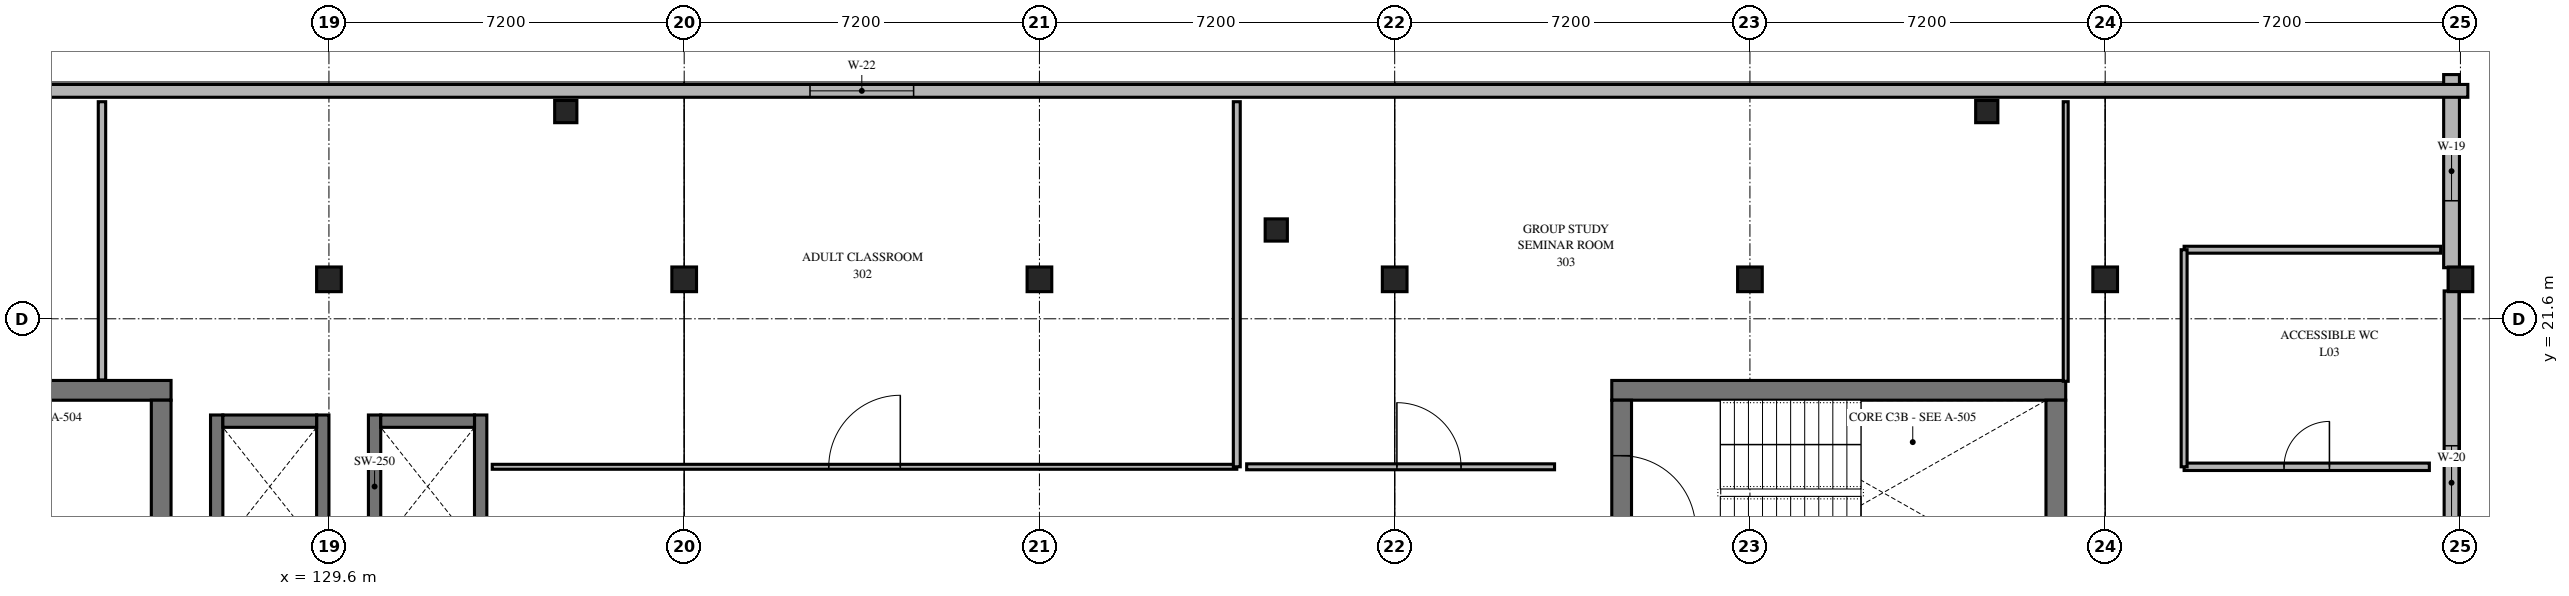
"""IFC4 building model, lengths in metres.
Left out: names, types, materials, properties, quantities, classifications, styles, units other than length and angle.
Written with IfcOpenShell. Run it as: python <this file> out.ifc"""

import sys

from ifc_helpers import new_model, si_unit, direction, frame, frame_2d, origin, origin_2d, place, context, subcontext, project, spatial, rectangle, extrude, element, fill, save


model = new_model("IFC4")
c1 = context("Model", 3, precision=1e-05, world=origin(), true_north=direction((0.0, 1.0)))
c2 = subcontext(c1, "Body", "Model", "MODEL_VIEW")
j1 = project(units=[si_unit("LENGTHUNIT", "METRE"), si_unit("PLANEANGLEUNIT", "RADIAN")], contexts=[c1])
p1 = place(None, origin())
s1 = spatial("IfcSite", under=j1, at=p1, CompositionType="ELEMENT")
p2 = place(p1, origin())
s2 = spatial("IfcBuilding", under=s1, at=p2, CompositionType="ELEMENT")
p3 = place(p2, frame((0.0, 0.0, 12.9)))
s3 = spatial("IfcBuildingStorey", under=s2, at=p3, CompositionType="ELEMENT", Elevation=12.9)
for number, where, z_axis, x_axis in (
    (1, (129.6, 22.4, 0.0), (0.0, 0.0, 1.0), (1.0, 0.0, 0.0)),
    (2, (136.8, 22.4, 0.0), (0.0, 0.0, 1.0), (1.0, 0.0, 0.0)),
    (3, (144.0, 22.4, 0.0), (0.0, 0.0, 1.0), (1.0, 0.0, 0.0)),
    (4, (151.2, 22.4, 0.0), (0.0, 0.0, 1.0), (1.0, 0.0, 0.0)),
    (5, (158.4, 22.4, 0.0), (0.0, 0.0, 1.0), (1.0, 0.0, 0.0)),
    (6, (165.6, 22.4, 0.0), (0.0, 0.0, 1.0), (1.0, 0.0, 0.0)),
    (7, (172.8, 22.4, 0.0), (0.0, 0.0, 1.0), (1.0, 0.0, 0.0)),
):
    element("IfcColumn", number, at=place(p3, frame(where, z_axis=z_axis, x_axis=x_axis)), inside=s3, PredefinedType="COLUMN", context=c2, shape_type="SweptSolid", body=[
        extrude(rectangle(XDim=0.5, YDim=0.5, at=origin_2d()), origin(), (0.0, 0.0, 1.0), 3.9),
    ])
for number, where, z_axis, x_axis in (
    (8, (134.4, 25.8, 0.0), (0.0, 0.0, 1.0), (1.0, 0.0, 0.0)),
    (9, (148.8, 23.4, 0.0), (0.0, 0.0, 1.0), (1.0, 0.0, 0.0)),
    (10, (163.2, 25.8, 0.0), (0.0, 0.0, 1.0), (1.0, 0.0, 0.0)),
):
    element("IfcColumn", number, at=place(p3, frame(where, z_axis=z_axis, x_axis=x_axis)), inside=s3, PredefinedType="COLUMN", context=c2, shape_type="SweptSolid", body=[
        extrude(rectangle(XDim=0.45, YDim=0.45, at=origin_2d()), origin(), (0.0, 0.0, 1.0), 3.67),
    ])
p4 = place(p3, frame((172.62, 26.55, 0.0), z_axis=(0.0, 0.0, 1.0), x_axis=(0.0, -1.0, 0.0)))
e11 = element("IfcWall", 11, at=p4, inside=s3, PredefinedType="SOLIDWALL", context=c2, shape_type="SweptSolid", body=[
    extrude(rectangle(XDim=3.915, YDim=0.32, at=frame_2d((1.958, 0.0))), origin(), (0.0, 0.0, 1.0), 2.91),
])
p5 = place(p4, frame((1.357, 0.0, 0.75)))
e12 = element("IfcOpeningElement", 12, at=p5, cuts=e11, PredefinedType="OPENING", context=c2, shape_type="SweptSolid", body=[
    extrude(rectangle(XDim=1.2, YDim=1.65, at=frame_2d((0.6, 0.825))), frame((0.0, 0.17, 0.0), z_axis=(0.0, -1.0, 0.0), x_axis=(1.0, 0.0, 0.0)), (0.0, 0.0, 1.0), 0.34),
])
p6 = place(p3, frame((172.62, 22.165, 0.0), z_axis=(0.0, 0.0, 1.0), x_axis=(0.0, -1.0, 0.0)))
e13 = element("IfcWall", 13, at=p6, inside=s3, PredefinedType="SOLIDWALL", context=c2, shape_type="SweptSolid", body=[
    extrude(rectangle(XDim=7.777, YDim=0.3, at=frame_2d((3.889, 0.0))), origin(), (0.0, 0.0, 1.0), 2.91),
])
p7 = place(p6, frame((3.138, 0.0, 0.75)))
e14 = element("IfcOpeningElement", 14, at=p7, cuts=e13, PredefinedType="OPENING", context=c2, shape_type="SweptSolid", body=[
    extrude(rectangle(XDim=1.5, YDim=1.65, at=frame_2d((0.75, 0.825))), frame((0.0, 0.16, 0.0), z_axis=(0.0, -1.0, 0.0), x_axis=(1.0, 0.0, 0.0)), (0.0, 0.0, 1.0), 0.32),
])
p8 = place(p3, frame((107.85, 26.22, 0.0), z_axis=(0.0, 0.0, 1.0), x_axis=(1.0, 0.0, 0.0)))
e15 = element("IfcWall", 15, at=p8, inside=s3, PredefinedType="SOLIDWALL", context=c2, shape_type="SweptSolid", body=[
    extrude(rectangle(XDim=65.1, YDim=0.26, at=frame_2d((32.55, 0.0))), origin(), (0.0, 0.0, 1.0), 3.66),
])
p9 = place(p8, frame((31.5, 0.0, 0.75)))
e16 = element("IfcOpeningElement", 16, at=p9, cuts=e15, PredefinedType="OPENING", context=c2, shape_type="SweptSolid", body=[
    extrude(rectangle(XDim=2.1, YDim=1.65, at=frame_2d((1.05, 0.825))), frame((0.0, 0.14, 0.0), z_axis=(0.0, -1.0, 0.0), x_axis=(1.0, 0.0, 0.0)), (0.0, 0.0, 1.0), 0.28),
])
p10 = place(p3, frame((126.4, 20.15, 0.0), z_axis=(0.0, 0.0, 1.0), x_axis=(-1.0, 0.0, 0.0)))
e17 = element("IfcWall", 17, at=p10, inside=s3, PredefinedType="SHEAR", context=c2, shape_type="SweptSolid", body=[
    extrude(rectangle(XDim=9.2, YDim=0.4, at=frame_2d((4.6, 0.0))), origin(), (0.0, 0.0, 1.0), 3.66),
])
p11 = place(p3, frame((126.2, 16.2, 0.0), z_axis=(0.0, 0.0, 1.0), x_axis=(0.0, 1.0, 0.0)))
e18 = element("IfcWall", 18, at=p11, inside=s3, PredefinedType="SHEAR", context=c2, shape_type="SweptSolid", body=[
    extrude(rectangle(XDim=3.75, YDim=0.4, at=frame_2d((1.875, 0.0))), origin(), (0.0, 0.0, 1.0), 3.66),
])
p12 = place(p3, frame((164.8, 20.15, 0.0), z_axis=(0.0, 0.0, 1.0), x_axis=(-1.0, 0.0, 0.0)))
e19 = element("IfcWall", 19, at=p12, inside=s3, PredefinedType="SHEAR", context=c2, shape_type="SweptSolid", body=[
    extrude(rectangle(XDim=9.2, YDim=0.4, at=frame_2d((4.6, 0.0))), origin(), (0.0, 0.0, 1.0), 3.66),
])
p13 = place(p3, frame((164.6, 16.2, 0.0), z_axis=(0.0, 0.0, 1.0), x_axis=(0.0, 1.0, 0.0)))
e20 = element("IfcWall", 20, at=p13, inside=s3, PredefinedType="SHEAR", context=c2, shape_type="SweptSolid", body=[
    extrude(rectangle(XDim=3.75, YDim=0.4, at=frame_2d((1.875, 0.0))), origin(), (0.0, 0.0, 1.0), 3.66),
])
p14 = place(p3, frame((155.8, 19.95, 0.0), z_axis=(0.0, 0.0, 1.0), x_axis=(0.0, -1.0, 0.0)))
e21 = element("IfcWall", 21, at=p14, inside=s3, PredefinedType="SHEAR", context=c2, shape_type="SweptSolid", body=[
    extrude(rectangle(XDim=3.75, YDim=0.4, at=frame_2d((1.875, 0.0))), origin(), (0.0, 0.0, 1.0), 3.66),
])
p15 = place(p14, frame((1.125, 0.0, 0.0)))
e22 = element("IfcOpeningElement", 22, at=p15, cuts=e21, PredefinedType="OPENING", context=c2, shape_type="SweptSolid", body=[
    extrude(rectangle(XDim=1.5, YDim=2.2, at=frame_2d((0.75, 1.1))), frame((0.0, 0.21, 0.0), z_axis=(0.0, -1.0, 0.0), x_axis=(1.0, 0.0, 0.0)), (0.0, 0.0, 1.0), 0.42),
])
for number, where, z_axis, x_axis in (
    (23, (127.325, 16.75, 0.0), (0.0, 0.0, 1.0), (0.0, 1.0, 0.0)),
    (24, (129.475, 19.65, 0.0), (0.0, 0.0, 1.0), (0.0, -1.0, 0.0)),
):
    element("IfcWall", number, at=place(p3, frame(where, z_axis=z_axis, x_axis=x_axis)), inside=s3, PredefinedType="SOLIDWALL", context=c2, shape_type="SweptSolid", body=[
        extrude(rectangle(XDim=2.9, YDim=0.25, at=frame_2d((1.45, 0.0))), origin(), (0.0, 0.0, 1.0), 3.66),
    ])
p16 = place(p3, frame((129.35, 19.525, 0.0), z_axis=(0.0, 0.0, 1.0), x_axis=(-1.0, 0.0, 0.0)))
e25 = element("IfcWall", 25, at=p16, inside=s3, PredefinedType="SOLIDWALL", context=c2, shape_type="SweptSolid", body=[
    extrude(rectangle(XDim=1.9, YDim=0.25, at=frame_2d((0.95, 0.0))), origin(), (0.0, 0.0, 1.0), 3.66),
])
for number, where, z_axis, x_axis in (
    (26, (130.525, 16.75, 0.0), (0.0, 0.0, 1.0), (0.0, 1.0, 0.0)),
    (27, (132.675, 19.65, 0.0), (0.0, 0.0, 1.0), (0.0, -1.0, 0.0)),
):
    element("IfcWall", number, at=place(p3, frame(where, z_axis=z_axis, x_axis=x_axis)), inside=s3, PredefinedType="SOLIDWALL", context=c2, shape_type="SweptSolid", body=[
        extrude(rectangle(XDim=2.9, YDim=0.25, at=frame_2d((1.45, 0.0))), origin(), (0.0, 0.0, 1.0), 3.66),
    ])
p17 = place(p3, frame((132.55, 19.525, 0.0), z_axis=(0.0, 0.0, 1.0), x_axis=(-1.0, 0.0, 0.0)))
e28 = element("IfcWall", 28, at=p17, inside=s3, PredefinedType="SOLIDWALL", context=c2, shape_type="SweptSolid", body=[
    extrude(rectangle(XDim=1.9, YDim=0.25, at=frame_2d((0.95, 0.0))), origin(), (0.0, 0.0, 1.0), 3.66),
])
p18 = place(p3, frame((132.91, 18.6, 0.0), z_axis=(0.0, 0.0, 1.0), x_axis=(1.0, 0.0, 0.0)))
e29 = element("IfcWall", 29, at=p18, inside=s3, PredefinedType="PARTITIONING", context=c2, shape_type="SweptSolid", body=[
    extrude(rectangle(XDim=15.09, YDim=0.1, at=frame_2d((7.545, 0.0))), origin(), (0.0, 0.0, 1.0), 2.96),
])
p19 = place(p18, frame((6.82, 0.0, 0.0)))
e30 = element("IfcOpeningElement", 30, at=p19, cuts=e29, PredefinedType="OPENING", context=c2, shape_type="SweptSolid", body=[
    extrude(rectangle(XDim=1.45, YDim=2.25, at=frame_2d((0.725, 1.125))), frame((0.0, 0.06, 0.0), z_axis=(0.0, -1.0, 0.0), x_axis=(1.0, 0.0, 0.0)), (0.0, 0.0, 1.0), 0.12),
])
p20 = place(p3, frame((125.0, 26.0, 0.0), z_axis=(0.0, 0.0, 1.0), x_axis=(0.0, -1.0, 0.0)))
e31 = element("IfcWall", 31, at=p20, inside=s3, PredefinedType="PARTITIONING", context=c2, shape_type="SweptSolid", body=[
    extrude(rectangle(XDim=5.64, YDim=0.15, at=frame_2d((2.82, 0.0))), origin(), (0.0, 0.0, 1.0), 2.86),
])
p21 = place(p3, frame((148.0, 18.6, 0.0), z_axis=(0.0, 0.0, 1.0), x_axis=(0.0, 1.0, 0.0)))
e32 = element("IfcWall", 32, at=p21, inside=s3, PredefinedType="PARTITIONING", context=c2, shape_type="SweptSolid", body=[
    extrude(rectangle(XDim=7.4, YDim=0.14, at=frame_2d((3.7, 0.0))), origin(), (0.0, 0.0, 1.0), 3.01),
])
p22 = place(p3, frame((148.2, 18.6, 0.0), z_axis=(0.0, 0.0, 1.0), x_axis=(1.0, 0.0, 0.0)))
e33 = element("IfcWall", 33, at=p22, inside=s3, PredefinedType="PARTITIONING", context=c2, shape_type="SweptSolid", body=[
    extrude(rectangle(XDim=6.24, YDim=0.12, at=frame_2d((3.12, 0.0))), origin(), (0.0, 0.0, 1.0), 2.86),
])
p23 = place(p22, frame((3.045, 0.0, 0.0)))
e34 = element("IfcOpeningElement", 34, at=p23, cuts=e33, PredefinedType="OPENING", context=c2, shape_type="SweptSolid", body=[
    extrude(rectangle(XDim=1.3, YDim=2.2, at=frame_2d((0.65, 1.1))), frame((0.0, 0.07, 0.0), z_axis=(0.0, -1.0, 0.0), x_axis=(1.0, 0.0, 0.0)), (0.0, 0.0, 1.0), 0.14),
])
p24 = place(p3, frame((164.8, 20.333, 0.0), z_axis=(0.0, 0.0, 1.0), x_axis=(0.0, 1.0, 0.0)))
e35 = element("IfcWall", 35, at=p24, inside=s3, PredefinedType="PARTITIONING", context=c2, shape_type="SweptSolid", body=[
    extrude(rectangle(XDim=5.667, YDim=0.1, at=frame_2d((2.833, 0.0))), origin(), (0.0, 0.0, 1.0), 2.86),
])
p25 = place(p3, frame((167.2, 18.6, 0.0), z_axis=(0.0, 0.0, 1.0), x_axis=(1.0, 0.0, 0.0)))
e36 = element("IfcWall", 36, at=p25, inside=s3, PredefinedType="PARTITIONING", context=c2, shape_type="SweptSolid", body=[
    extrude(rectangle(XDim=4.97, YDim=0.15, at=frame_2d((2.485, 0.0))), origin(), (0.0, 0.0, 1.0), 3.66),
])
p26 = place(p25, frame((2.025, 0.0, 0.0)))
e37 = element("IfcOpeningElement", 37, at=p26, cuts=e36, PredefinedType="OPENING", context=c2, shape_type="SweptSolid", body=[
    extrude(rectangle(XDim=0.92, YDim=2.1, at=frame_2d((0.46, 1.05))), frame((0.0, 0.085, 0.0), z_axis=(0.0, -1.0, 0.0), x_axis=(1.0, 0.0, 0.0)), (0.0, 0.0, 1.0), 0.17),
])
p27 = place(p3, frame((172.4, 23.0, 0.0), z_axis=(0.0, 0.0, 1.0), x_axis=(-1.0, 0.0, 0.0)))
e38 = element("IfcWall", 38, at=p27, inside=s3, PredefinedType="PARTITIONING", context=c2, shape_type="SweptSolid", body=[
    extrude(rectangle(XDim=5.2, YDim=0.14, at=frame_2d((2.6, 0.0))), origin(), (0.0, 0.0, 1.0), 3.66),
])
p28 = place(p3, frame((167.2, 23.0, 0.0), z_axis=(0.0, 0.0, 1.0), x_axis=(0.0, -1.0, 0.0)))
e39 = element("IfcWall", 39, at=p28, inside=s3, PredefinedType="PARTITIONING", context=c2, shape_type="SweptSolid", body=[
    extrude(rectangle(XDim=4.4, YDim=0.12, at=frame_2d((2.2, 0.0))), origin(), (0.0, 0.0, 1.0), 2.91),
])
p29 = place(p5, origin())
e40 = element("IfcWindow", 40, at=p29, inside=s3, PartitioningType="SINGLE_PANEL", PredefinedType="WINDOW", context=c2, shape_type="SweptSolid", body=[
    extrude(rectangle(XDim=1.2, YDim=1.65, at=frame_2d((0.6, 0.825))), frame((0.0, 0.03, 0.0), z_axis=(0.0, -1.0, 0.0), x_axis=(1.0, 0.0, 0.0)), (0.0, 0.0, 1.0), 0.06),
])
fill(e12, e40)
p30 = place(p7, origin())
e41 = element("IfcWindow", 41, at=p30, inside=s3, PartitioningType="SINGLE_PANEL", PredefinedType="WINDOW", context=c2, shape_type="SweptSolid", body=[
    extrude(rectangle(XDim=1.5, YDim=1.65, at=frame_2d((0.75, 0.825))), frame((0.0, 0.03, 0.0), z_axis=(0.0, -1.0, 0.0), x_axis=(1.0, 0.0, 0.0)), (0.0, 0.0, 1.0), 0.06),
])
fill(e14, e41)
p31 = place(p9, origin())
e42 = element("IfcWindow", 42, at=p31, inside=s3, PartitioningType="SINGLE_PANEL", PredefinedType="WINDOW", context=c2, shape_type="SweptSolid", body=[
    extrude(rectangle(XDim=2.1, YDim=1.65, at=frame_2d((1.05, 0.825))), frame((0.0, 0.03, 0.0), z_axis=(0.0, -1.0, 0.0), x_axis=(1.0, 0.0, 0.0)), (0.0, 0.0, 1.0), 0.06),
])
fill(e16, e42)
p32 = place(p15, origin())
e43 = element("IfcDoor", 43, at=p32, inside=s3, OperationType="SINGLE_SWING_RIGHT", PredefinedType="DOOR", context=c2, shape_type="SweptSolid", body=[
    extrude(rectangle(XDim=1.5, YDim=2.2, at=frame_2d((0.75, 1.1))), frame((0.0, 0.025, 0.0), z_axis=(0.0, -1.0, 0.0), x_axis=(1.0, 0.0, 0.0)), (0.0, 0.0, 1.0), 0.05),
])
fill(e22, e43)
p33 = place(p19, origin())
e44 = element("IfcDoor", 44, at=p33, inside=s3, OperationType="SINGLE_SWING_RIGHT", PredefinedType="DOOR", context=c2, shape_type="SweptSolid", body=[
    extrude(rectangle(XDim=1.45, YDim=2.25, at=frame_2d((0.725, 1.125))), frame((0.0, 0.025, 0.0), z_axis=(0.0, -1.0, 0.0), x_axis=(1.0, 0.0, 0.0)), (0.0, 0.0, 1.0), 0.05),
])
fill(e30, e44)
p34 = place(p23, origin())
e45 = element("IfcDoor", 45, at=p34, inside=s3, OperationType="SINGLE_SWING_LEFT", PredefinedType="DOOR", context=c2, shape_type="SweptSolid", body=[
    extrude(rectangle(XDim=1.3, YDim=2.2, at=frame_2d((0.65, 1.1))), frame((0.0, 0.025, 0.0), z_axis=(0.0, -1.0, 0.0), x_axis=(1.0, 0.0, 0.0)), (0.0, 0.0, 1.0), 0.05),
])
fill(e34, e45)
p35 = place(p26, origin())
e46 = element("IfcDoor", 46, at=p35, inside=s3, OperationType="SINGLE_SWING_RIGHT", PredefinedType="DOOR", context=c2, shape_type="SweptSolid", body=[
    extrude(rectangle(XDim=0.92, YDim=2.1, at=frame_2d((0.46, 1.05))), frame((0.0, 0.025, 0.0), z_axis=(0.0, -1.0, 0.0), x_axis=(1.0, 0.0, 0.0)), (0.0, 0.0, 1.0), 0.05),
])
fill(e37, e46)
save(model, sys.argv[1])
